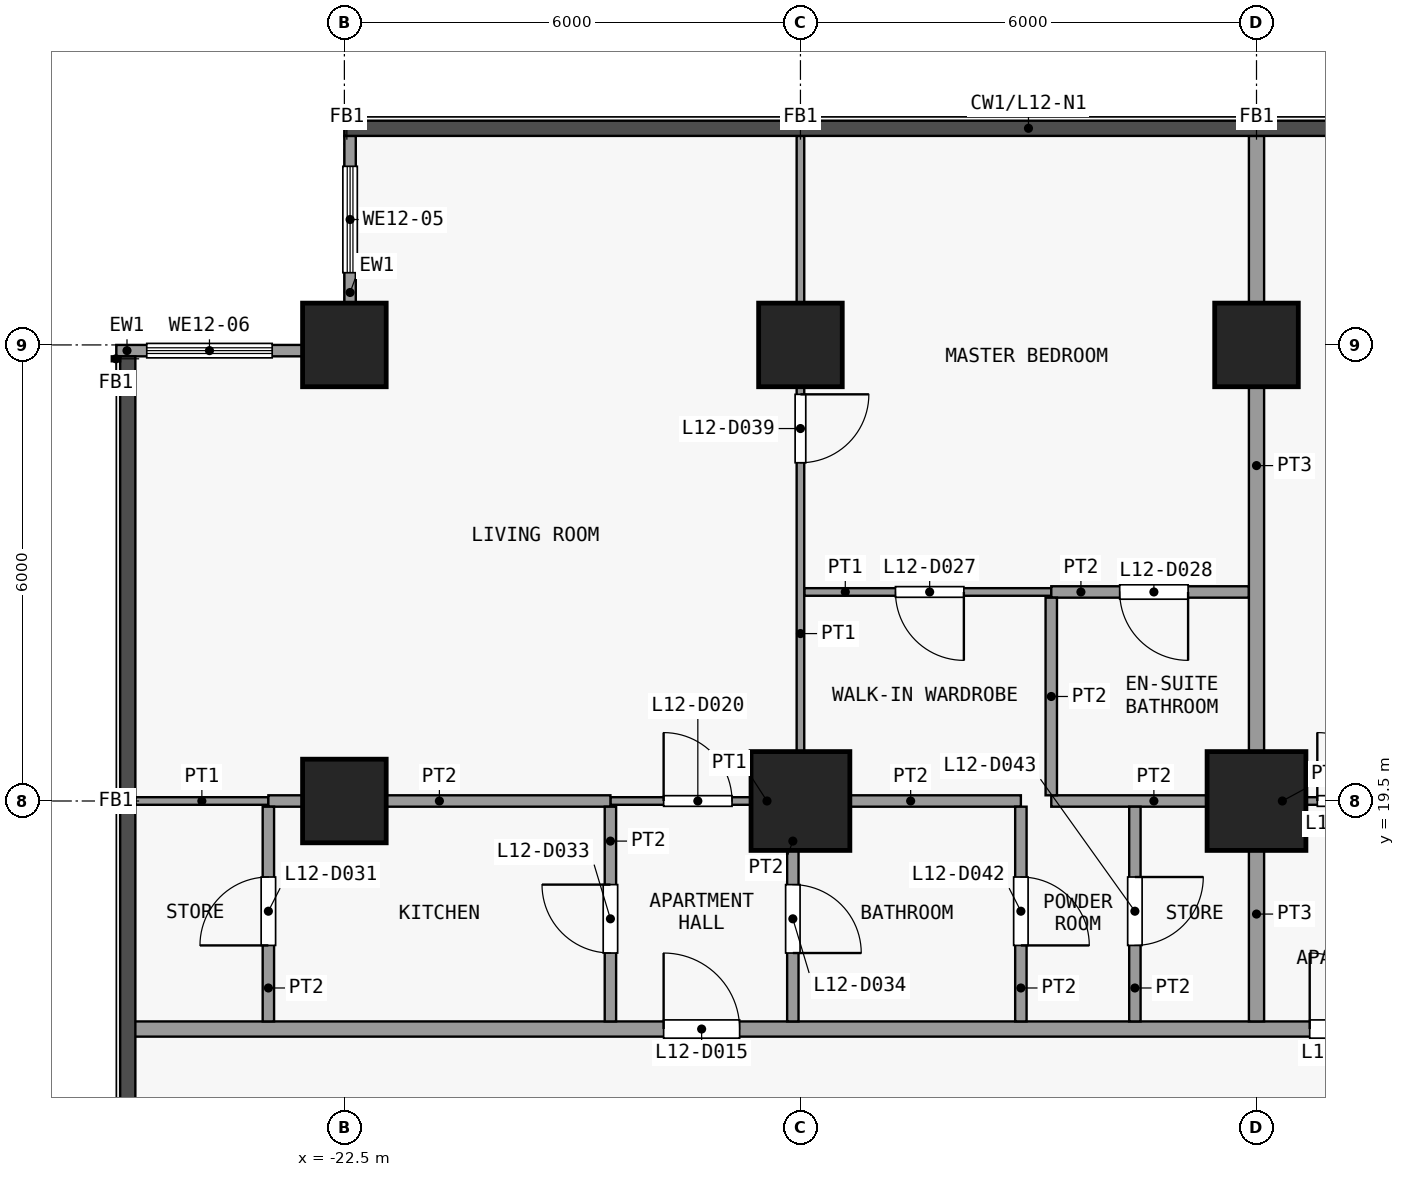
"""IFC4 building model, lengths in metres.
Left out: names, types, materials, properties, quantities, classifications, styles, units other than length and angle.
Written with IfcOpenShell. Run it as: python <this file> out.ifc"""

import sys

from ifc_helpers import new_model, si_unit, direction, frame, frame_2d, origin, origin_2d, place, context, subcontext, project, spatial, rectangle, extrude, element, fill, save


model = new_model("IFC4")
c1 = context("Model", 3, precision=1e-05, world=origin(), true_north=direction((0.0, 1.0)))
c2 = subcontext(c1, "Body", "Model", "MODEL_VIEW")
j1 = project(units=[si_unit("LENGTHUNIT", "METRE"), si_unit("PLANEANGLEUNIT", "RADIAN")], contexts=[c1])
p1 = place(None, origin())
s1 = spatial("IfcSite", under=j1, at=p1, CompositionType="ELEMENT")
p2 = place(p1, origin())
s2 = spatial("IfcBuilding", under=s1, at=p2, CompositionType="ELEMENT")
p3 = place(p2, frame((0.0, 0.0, 54.1)))
s3 = spatial("IfcBuildingStorey", under=s2, at=p3, CompositionType="ELEMENT", Elevation=54.1)
for number, where, z_axis, x_axis in (
    (1, (-22.5, 19.5, 0.0), (0.0, 0.0, 1.0), (1.0, 0.0, 0.0)),
    (2, (-22.5, 25.5, 0.0), (0.0, 0.0, 1.0), (1.0, 0.0, 0.0)),
):
    element("IfcColumn", number, at=place(p3, frame(where, z_axis=z_axis, x_axis=x_axis)), inside=s3, PredefinedType="COLUMN", context=c2, shape_type="SweptSolid", body=[
        extrude(rectangle(XDim=1.1, YDim=1.1, at=origin_2d()), origin(), (0.0, 0.0, 1.0), 3.6),
    ])
p4 = place(p3, frame((-16.5, 19.5, 0.0), z_axis=(0.0, 0.0, 1.0), x_axis=(1.0, 0.0, 0.0)))
e3 = element("IfcColumn", 3, at=p4, inside=s3, PredefinedType="COLUMN", context=c2, shape_type="SweptSolid", body=[
    extrude(rectangle(XDim=1.3, YDim=1.3, at=origin_2d()), origin(), (0.0, 0.0, 1.0), 3.6),
])
p5 = place(p3, frame((-16.5, 25.5, 0.0), z_axis=(0.0, 0.0, 1.0), x_axis=(1.0, 0.0, 0.0)))
e4 = element("IfcColumn", 4, at=p5, inside=s3, PredefinedType="COLUMN", context=c2, shape_type="SweptSolid", body=[
    extrude(rectangle(XDim=1.1, YDim=1.1, at=origin_2d()), origin(), (0.0, 0.0, 1.0), 3.6),
])
p6 = place(p3, frame((-10.5, 19.5, 0.0), z_axis=(0.0, 0.0, 1.0), x_axis=(1.0, 0.0, 0.0)))
e5 = element("IfcColumn", 5, at=p6, inside=s3, PredefinedType="COLUMN", context=c2, shape_type="SweptSolid", body=[
    extrude(rectangle(XDim=1.3, YDim=1.3, at=origin_2d()), origin(), (0.0, 0.0, 1.0), 3.6),
])
p7 = place(p3, frame((-10.5, 25.5, 0.0), z_axis=(0.0, 0.0, 1.0), x_axis=(1.0, 0.0, 0.0)))
e6 = element("IfcColumn", 6, at=p7, inside=s3, PredefinedType="COLUMN", context=c2, shape_type="SweptSolid", body=[
    extrude(rectangle(XDim=1.1, YDim=1.1, at=origin_2d()), origin(), (0.0, 0.0, 1.0), 3.6),
])
p8 = place(p3, frame((-22.425, 26.05, 0.0), z_axis=(0.0, 0.0, 1.0), x_axis=(0.0, 1.0, 0.0)))
e7 = element("IfcWall", 7, at=p8, inside=s3, PredefinedType="SOLIDWALL", context=c2, shape_type="SweptSolid", body=[
    extrude(rectangle(XDim=2.2, YDim=0.15, at=frame_2d((1.1, 0.0))), origin(), (0.0, 0.0, 1.0), 3.3),
])
p9 = place(p8, frame((0.4, 0.0, 0.9)))
e8 = element("IfcOpeningElement", 8, at=p9, cuts=e7, PredefinedType="OPENING", context=c2, shape_type="SweptSolid", body=[
    extrude(rectangle(XDim=1.4, YDim=2.4, at=frame_2d((0.7, 1.2))), frame((0.0, 0.085, 0.0), z_axis=(0.0, -1.0, 0.0), x_axis=(1.0, 0.0, 0.0)), (0.0, 0.0, 1.0), 0.17),
])
p10 = place(p3, frame((-25.5, 25.425, 0.0), z_axis=(0.0, 0.0, 1.0), x_axis=(1.0, 0.0, 0.0)))
e9 = element("IfcWall", 9, at=p10, inside=s3, PredefinedType="SOLIDWALL", context=c2, shape_type="SweptSolid", body=[
    extrude(rectangle(XDim=2.45, YDim=0.15, at=frame_2d((1.225, 0.0))), origin(), (0.0, 0.0, 1.0), 3.3),
])
p11 = place(p10, frame((0.4, 0.0, 0.9)))
e10 = element("IfcOpeningElement", 10, at=p11, cuts=e9, PredefinedType="OPENING", context=c2, shape_type="SweptSolid", body=[
    extrude(rectangle(XDim=1.65, YDim=2.4, at=frame_2d((0.825, 1.2))), frame((0.0, 0.085, 0.0), z_axis=(0.0, -1.0, 0.0), x_axis=(1.0, 0.0, 0.0)), (0.0, 0.0, 1.0), 0.17),
])
p12 = place(p3, frame((-25.35, 16.5, 0.0), z_axis=(0.0, 0.0, 1.0), x_axis=(1.0, 0.0, 0.0)))
e11 = element("IfcWall", 11, at=p12, inside=s3, PredefinedType="PARTITIONING", context=c2, shape_type="SweptSolid", body=[
    extrude(rectangle(XDim=49.2, YDim=0.2, at=frame_2d((24.6, 0.0))), origin(), (0.0, 0.0, 1.0), 3.3),
])
p13 = place(p12, frame((7.05, 0.0, 0.0)))
e12 = element("IfcOpeningElement", 12, at=p13, cuts=e11, PredefinedType="OPENING", context=c2, shape_type="SweptSolid", body=[
    extrude(rectangle(XDim=1.0, YDim=2.1, at=frame_2d((0.5, 1.05))), frame((0.0, 0.11, 0.0), z_axis=(0.0, -1.0, 0.0), x_axis=(1.0, 0.0, 0.0)), (0.0, 0.0, 1.0), 0.22),
])
p14 = place(p12, frame((15.55, 0.0, 0.0)))
e13 = element("IfcOpeningElement", 13, at=p14, cuts=e11, PredefinedType="OPENING", context=c2, shape_type="SweptSolid", body=[
    extrude(rectangle(XDim=1.0, YDim=2.1, at=frame_2d((0.5, 1.05))), frame((0.0, 0.11, 0.0), z_axis=(0.0, -1.0, 0.0), x_axis=(1.0, 0.0, 0.0)), (0.0, 0.0, 1.0), 0.22),
])
p15 = place(p12, frame((24.05, 0.0, 0.0)))
e14 = element("IfcOpeningElement", 14, at=p15, cuts=e11, PredefinedType="OPENING", context=c2, shape_type="SweptSolid", body=[
    extrude(rectangle(XDim=1.0, YDim=2.1, at=frame_2d((0.5, 1.05))), frame((0.0, 0.11, 0.0), z_axis=(0.0, -1.0, 0.0), x_axis=(1.0, 0.0, 0.0)), (0.0, 0.0, 1.0), 0.22),
])
p16 = place(p12, frame((36.55, 0.0, 0.0)))
e15 = element("IfcOpeningElement", 15, at=p16, cuts=e11, PredefinedType="OPENING", context=c2, shape_type="SweptSolid", body=[
    extrude(rectangle(XDim=1.0, YDim=2.1, at=frame_2d((0.5, 1.05))), frame((0.0, 0.11, 0.0), z_axis=(0.0, -1.0, 0.0), x_axis=(1.0, 0.0, 0.0)), (0.0, 0.0, 1.0), 0.22),
])
p17 = place(p12, frame((45.05, 0.0, 0.0)))
e16 = element("IfcOpeningElement", 16, at=p17, cuts=e11, PredefinedType="OPENING", context=c2, shape_type="SweptSolid", body=[
    extrude(rectangle(XDim=1.0, YDim=2.1, at=frame_2d((0.5, 1.05))), frame((0.0, 0.11, 0.0), z_axis=(0.0, -1.0, 0.0), x_axis=(1.0, 0.0, 0.0)), (0.0, 0.0, 1.0), 0.22),
])
p18 = place(p3, frame((-25.25, 19.5, 0.0), z_axis=(0.0, 0.0, 1.0), x_axis=(1.0, 0.0, 0.0)))
e17 = element("IfcWall", 17, at=p18, inside=s3, PredefinedType="PARTITIONING", context=c2, shape_type="SweptSolid", body=[
    extrude(rectangle(XDim=1.75, YDim=0.1, at=frame_2d((0.875, 0.0))), origin(), (0.0, 0.0, 1.0), 3.3),
])
p19 = place(p3, frame((-19.0, 19.5, 0.0), z_axis=(0.0, 0.0, 1.0), x_axis=(1.0, 0.0, 0.0)))
e18 = element("IfcWall", 18, at=p19, inside=s3, PredefinedType="PARTITIONING", context=c2, shape_type="SweptSolid", body=[
    extrude(rectangle(XDim=2.4, YDim=0.1, at=frame_2d((1.2, 0.0))), origin(), (0.0, 0.0, 1.0), 3.3),
])
p20 = place(p19, frame((0.7, 0.0, 0.0)))
e19 = element("IfcOpeningElement", 19, at=p20, cuts=e18, PredefinedType="OPENING", context=c2, shape_type="SweptSolid", body=[
    extrude(rectangle(XDim=0.9, YDim=2.1, at=frame_2d((0.45, 1.05))), frame((0.0, 0.06, 0.0), z_axis=(0.0, -1.0, 0.0), x_axis=(1.0, 0.0, 0.0)), (0.0, 0.0, 1.0), 0.12),
])
p21 = place(p3, frame((-10.5, 19.5, 0.0), z_axis=(0.0, 0.0, 1.0), x_axis=(1.0, 0.0, 0.0)))
e20 = element("IfcWall", 20, at=p21, inside=s3, PredefinedType="PARTITIONING", context=c2, shape_type="SweptSolid", body=[
    extrude(rectangle(XDim=2.4, YDim=0.1, at=frame_2d((1.2, 0.0))), origin(), (0.0, 0.0, 1.0), 3.3),
])
p22 = place(p21, frame((0.8, 0.0, 0.0)))
e21 = element("IfcOpeningElement", 21, at=p22, cuts=e20, PredefinedType="OPENING", context=c2, shape_type="SweptSolid", body=[
    extrude(rectangle(XDim=0.9, YDim=2.1, at=frame_2d((0.45, 1.05))), frame((0.0, 0.06, 0.0), z_axis=(0.0, -1.0, 0.0), x_axis=(1.0, 0.0, 0.0)), (0.0, 0.0, 1.0), 0.12),
])
p23 = place(p3, frame((-23.5, 19.5, 0.0), z_axis=(0.0, 0.0, 1.0), x_axis=(1.0, 0.0, 0.0)))
e22 = element("IfcWall", 22, at=p23, inside=s3, PredefinedType="PARTITIONING", context=c2, shape_type="SweptSolid", body=[
    extrude(rectangle(XDim=4.5, YDim=0.15, at=frame_2d((2.25, 0.0))), origin(), (0.0, 0.0, 1.0), 3.3),
])
p24 = place(p3, frame((-16.5, 19.5, 0.0), z_axis=(0.0, 0.0, 1.0), x_axis=(1.0, 0.0, 0.0)))
e23 = element("IfcWall", 23, at=p24, inside=s3, PredefinedType="PARTITIONING", context=c2, shape_type="SweptSolid", body=[
    extrude(rectangle(XDim=2.9, YDim=0.15, at=frame_2d((1.45, 0.0))), origin(), (0.0, 0.0, 1.0), 3.3),
])
p25 = place(p3, frame((-13.2, 19.5, 0.0), z_axis=(0.0, 0.0, 1.0), x_axis=(1.0, 0.0, 0.0)))
e24 = element("IfcWall", 24, at=p25, inside=s3, PredefinedType="PARTITIONING", context=c2, shape_type="SweptSolid", body=[
    extrude(rectangle(XDim=2.7, YDim=0.15, at=frame_2d((1.35, 0.0))), origin(), (0.0, 0.0, 1.0), 3.3),
])
p26 = place(p3, frame((-16.45, 22.25, 0.0), z_axis=(0.0, 0.0, 1.0), x_axis=(1.0, 0.0, 0.0)))
e25 = element("IfcWall", 25, at=p26, inside=s3, PredefinedType="PARTITIONING", context=c2, shape_type="SweptSolid", body=[
    extrude(rectangle(XDim=3.25, YDim=0.1, at=frame_2d((1.625, 0.0))), origin(), (0.0, 0.0, 1.0), 3.3),
])
p27 = place(p26, frame((1.2, 0.0, 0.0)))
e26 = element("IfcOpeningElement", 26, at=p27, cuts=e25, PredefinedType="OPENING", context=c2, shape_type="SweptSolid", body=[
    extrude(rectangle(XDim=0.9, YDim=2.1, at=frame_2d((0.45, 1.05))), frame((0.0, 0.06, 0.0), z_axis=(0.0, -1.0, 0.0), x_axis=(1.0, 0.0, 0.0)), (0.0, 0.0, 1.0), 0.12),
])
p28 = place(p3, frame((-13.2, 22.25, 0.0), z_axis=(0.0, 0.0, 1.0), x_axis=(1.0, 0.0, 0.0)))
e27 = element("IfcWall", 27, at=p28, inside=s3, PredefinedType="PARTITIONING", context=c2, shape_type="SweptSolid", body=[
    extrude(rectangle(XDim=2.6, YDim=0.15, at=frame_2d((1.3, 0.0))), origin(), (0.0, 0.0, 1.0), 3.3),
])
p29 = place(p28, frame((0.9, 0.0, 0.0)))
e28 = element("IfcOpeningElement", 28, at=p29, cuts=e27, PredefinedType="OPENING", context=c2, shape_type="SweptSolid", body=[
    extrude(rectangle(XDim=0.9, YDim=2.1, at=frame_2d((0.45, 1.05))), frame((0.0, 0.085, 0.0), z_axis=(0.0, -1.0, 0.0), x_axis=(1.0, 0.0, 0.0)), (0.0, 0.0, 1.0), 0.17),
])
p30 = place(p3, frame((-23.5, 16.6, 0.0), z_axis=(0.0, 0.0, 1.0), x_axis=(0.0, 1.0, 0.0)))
e29 = element("IfcWall", 29, at=p30, inside=s3, PredefinedType="PARTITIONING", context=c2, shape_type="SweptSolid", body=[
    extrude(rectangle(XDim=2.825, YDim=0.15, at=frame_2d((1.413, 0.0))), origin(), (0.0, 0.0, 1.0), 3.3),
])
p31 = place(p30, frame((1.0, 0.0, 0.0)))
e30 = element("IfcOpeningElement", 30, at=p31, cuts=e29, PredefinedType="OPENING", context=c2, shape_type="SweptSolid", body=[
    extrude(rectangle(XDim=0.9, YDim=2.1, at=frame_2d((0.45, 1.05))), frame((0.0, 0.085, 0.0), z_axis=(0.0, -1.0, 0.0), x_axis=(1.0, 0.0, 0.0)), (0.0, 0.0, 1.0), 0.17),
])
p32 = place(p3, frame((-19.0, 16.6, 0.0), z_axis=(0.0, 0.0, 1.0), x_axis=(0.0, 1.0, 0.0)))
e31 = element("IfcWall", 31, at=p32, inside=s3, PredefinedType="PARTITIONING", context=c2, shape_type="SweptSolid", body=[
    extrude(rectangle(XDim=2.825, YDim=0.15, at=frame_2d((1.413, 0.0))), origin(), (0.0, 0.0, 1.0), 3.3),
])
p33 = place(p32, frame((0.9, 0.0, 0.0)))
e32 = element("IfcOpeningElement", 32, at=p33, cuts=e31, PredefinedType="OPENING", context=c2, shape_type="SweptSolid", body=[
    extrude(rectangle(XDim=0.9, YDim=2.1, at=frame_2d((0.45, 1.05))), frame((0.0, 0.085, 0.0), z_axis=(0.0, -1.0, 0.0), x_axis=(1.0, 0.0, 0.0)), (0.0, 0.0, 1.0), 0.17),
])
p34 = place(p3, frame((-16.6, 16.6, 0.0), z_axis=(0.0, 0.0, 1.0), x_axis=(0.0, 1.0, 0.0)))
e33 = element("IfcWall", 33, at=p34, inside=s3, PredefinedType="PARTITIONING", context=c2, shape_type="SweptSolid", body=[
    extrude(rectangle(XDim=2.825, YDim=0.15, at=frame_2d((1.413, 0.0))), origin(), (0.0, 0.0, 1.0), 3.3),
])
p35 = place(p34, frame((0.9, 0.0, 0.0)))
e34 = element("IfcOpeningElement", 34, at=p35, cuts=e33, PredefinedType="OPENING", context=c2, shape_type="SweptSolid", body=[
    extrude(rectangle(XDim=0.9, YDim=2.1, at=frame_2d((0.45, 1.05))), frame((0.0, 0.085, 0.0), z_axis=(0.0, -1.0, 0.0), x_axis=(1.0, 0.0, 0.0)), (0.0, 0.0, 1.0), 0.17),
])
p36 = place(p3, frame((-16.5, 19.575, 0.0), z_axis=(0.0, 0.0, 1.0), x_axis=(0.0, 1.0, 0.0)))
e35 = element("IfcWall", 35, at=p36, inside=s3, PredefinedType="PARTITIONING", context=c2, shape_type="SweptSolid", body=[
    extrude(rectangle(XDim=8.675, YDim=0.1, at=frame_2d((4.337, 0.0))), origin(), (0.0, 0.0, 1.0), 3.3),
])
p37 = place(p36, frame((4.375, 0.0, 0.0)))
e36 = element("IfcOpeningElement", 36, at=p37, cuts=e35, PredefinedType="OPENING", context=c2, shape_type="SweptSolid", body=[
    extrude(rectangle(XDim=0.9, YDim=2.1, at=frame_2d((0.45, 1.05))), frame((0.0, 0.06, 0.0), z_axis=(0.0, -1.0, 0.0), x_axis=(1.0, 0.0, 0.0)), (0.0, 0.0, 1.0), 0.12),
])
p38 = place(p3, frame((-13.6, 16.6, 0.0), z_axis=(0.0, 0.0, 1.0), x_axis=(0.0, 1.0, 0.0)))
e37 = element("IfcWall", 37, at=p38, inside=s3, PredefinedType="PARTITIONING", context=c2, shape_type="SweptSolid", body=[
    extrude(rectangle(XDim=2.825, YDim=0.15, at=frame_2d((1.413, 0.0))), origin(), (0.0, 0.0, 1.0), 3.3),
])
p39 = place(p38, frame((1.0, 0.0, 0.0)))
e38 = element("IfcOpeningElement", 38, at=p39, cuts=e37, PredefinedType="OPENING", context=c2, shape_type="SweptSolid", body=[
    extrude(rectangle(XDim=0.9, YDim=2.1, at=frame_2d((0.45, 1.05))), frame((0.0, 0.085, 0.0), z_axis=(0.0, -1.0, 0.0), x_axis=(1.0, 0.0, 0.0)), (0.0, 0.0, 1.0), 0.17),
])
p40 = place(p3, frame((-13.2, 19.575, 0.0), z_axis=(0.0, 0.0, 1.0), x_axis=(0.0, 1.0, 0.0)))
e39 = element("IfcWall", 39, at=p40, inside=s3, PredefinedType="PARTITIONING", context=c2, shape_type="SweptSolid", body=[
    extrude(rectangle(XDim=2.6, YDim=0.15, at=frame_2d((1.3, 0.0))), origin(), (0.0, 0.0, 1.0), 3.3),
])
p41 = place(p3, frame((-12.1, 16.6, 0.0), z_axis=(0.0, 0.0, 1.0), x_axis=(0.0, 1.0, 0.0)))
e40 = element("IfcWall", 40, at=p41, inside=s3, PredefinedType="PARTITIONING", context=c2, shape_type="SweptSolid", body=[
    extrude(rectangle(XDim=2.825, YDim=0.15, at=frame_2d((1.413, 0.0))), origin(), (0.0, 0.0, 1.0), 3.3),
])
p42 = place(p41, frame((1.0, 0.0, 0.0)))
e41 = element("IfcOpeningElement", 41, at=p42, cuts=e40, PredefinedType="OPENING", context=c2, shape_type="SweptSolid", body=[
    extrude(rectangle(XDim=0.9, YDim=2.1, at=frame_2d((0.45, 1.05))), frame((0.0, 0.085, 0.0), z_axis=(0.0, -1.0, 0.0), x_axis=(1.0, 0.0, 0.0)), (0.0, 0.0, 1.0), 0.17),
])
p43 = place(p3, frame((-10.5, 16.6, 0.0), z_axis=(0.0, 0.0, 1.0), x_axis=(0.0, 1.0, 0.0)))
e42 = element("IfcWall", 42, at=p43, inside=s3, PredefinedType="PARTITIONING", context=c2, shape_type="SweptSolid", body=[
    extrude(rectangle(XDim=2.825, YDim=0.2, at=frame_2d((1.413, 0.0))), origin(), (0.0, 0.0, 1.0), 3.3),
])
p44 = place(p3, frame((-10.5, 19.575, 0.0), z_axis=(0.0, 0.0, 1.0), x_axis=(0.0, 1.0, 0.0)))
e43 = element("IfcWall", 43, at=p44, inside=s3, PredefinedType="PARTITIONING", context=c2, shape_type="SweptSolid", body=[
    extrude(rectangle(XDim=8.675, YDim=0.2, at=frame_2d((4.337, 0.0))), origin(), (0.0, 0.0, 1.0), 3.3),
])
p45 = place(p9, origin())
e44 = element("IfcWindow", 44, at=p45, inside=s3, PartitioningType="SINGLE_PANEL", PredefinedType="WINDOW", context=c2, shape_type="SweptSolid", body=[
    extrude(rectangle(XDim=1.4, YDim=2.4, at=frame_2d((0.7, 1.2))), frame((0.0, 0.03, 0.0), z_axis=(0.0, -1.0, 0.0), x_axis=(1.0, 0.0, 0.0)), (0.0, 0.0, 1.0), 0.06),
])
fill(e8, e44)
p46 = place(p11, origin())
e45 = element("IfcWindow", 45, at=p46, inside=s3, PartitioningType="SINGLE_PANEL", PredefinedType="WINDOW", context=c2, shape_type="SweptSolid", body=[
    extrude(rectangle(XDim=1.65, YDim=2.4, at=frame_2d((0.825, 1.2))), frame((0.0, 0.03, 0.0), z_axis=(0.0, -1.0, 0.0), x_axis=(1.0, 0.0, 0.0)), (0.0, 0.0, 1.0), 0.06),
])
fill(e10, e45)
p47 = place(p13, origin())
e46 = element("IfcDoor", 46, at=p47, inside=s3, OperationType="SINGLE_SWING_RIGHT", PredefinedType="DOOR", context=c2, shape_type="SweptSolid", body=[
    extrude(rectangle(XDim=1.0, YDim=2.1, at=frame_2d((0.5, 1.05))), frame((0.0, 0.025, 0.0), z_axis=(0.0, -1.0, 0.0), x_axis=(1.0, 0.0, 0.0)), (0.0, 0.0, 1.0), 0.05),
])
fill(e12, e46)
p48 = place(p14, origin())
e47 = element("IfcDoor", 47, at=p48, inside=s3, OperationType="SINGLE_SWING_RIGHT", PredefinedType="DOOR", context=c2, shape_type="SweptSolid", body=[
    extrude(rectangle(XDim=1.0, YDim=2.1, at=frame_2d((0.5, 1.05))), frame((0.0, 0.025, 0.0), z_axis=(0.0, -1.0, 0.0), x_axis=(1.0, 0.0, 0.0)), (0.0, 0.0, 1.0), 0.05),
])
fill(e13, e47)
p49 = place(p20, origin())
e48 = element("IfcDoor", 48, at=p49, inside=s3, OperationType="SINGLE_SWING_RIGHT", PredefinedType="DOOR", context=c2, shape_type="SweptSolid", body=[
    extrude(rectangle(XDim=0.9, YDim=2.1, at=frame_2d((0.45, 1.05))), frame((0.0, 0.025, 0.0), z_axis=(0.0, -1.0, 0.0), x_axis=(1.0, 0.0, 0.0)), (0.0, 0.0, 1.0), 0.05),
])
fill(e19, e48)
p50 = place(p22, origin())
e49 = element("IfcDoor", 49, at=p50, inside=s3, OperationType="SINGLE_SWING_RIGHT", PredefinedType="DOOR", context=c2, shape_type="SweptSolid", body=[
    extrude(rectangle(XDim=0.9, YDim=2.1, at=frame_2d((0.45, 1.05))), frame((0.0, 0.025, 0.0), z_axis=(0.0, -1.0, 0.0), x_axis=(1.0, 0.0, 0.0)), (0.0, 0.0, 1.0), 0.05),
])
fill(e21, e49)
p51 = place(p27, origin())
e50 = element("IfcDoor", 50, at=p51, inside=s3, OperationType="SINGLE_SWING_RIGHT", PredefinedType="DOOR", context=c2, shape_type="SweptSolid", body=[
    extrude(rectangle(XDim=0.9, YDim=2.1, at=frame_2d((0.45, 1.05))), frame((0.0, 0.025, 0.0), z_axis=(0.0, -1.0, 0.0), x_axis=(1.0, 0.0, 0.0)), (0.0, 0.0, 1.0), 0.05),
])
fill(e26, e50)
p52 = place(p29, origin())
e51 = element("IfcDoor", 51, at=p52, inside=s3, OperationType="SINGLE_SWING_RIGHT", PredefinedType="DOOR", context=c2, shape_type="SweptSolid", body=[
    extrude(rectangle(XDim=0.9, YDim=2.1, at=frame_2d((0.45, 1.05))), frame((0.0, 0.025, 0.0), z_axis=(0.0, -1.0, 0.0), x_axis=(1.0, 0.0, 0.0)), (0.0, 0.0, 1.0), 0.05),
])
fill(e28, e51)
p53 = place(p31, origin())
e52 = element("IfcDoor", 52, at=p53, inside=s3, OperationType="SINGLE_SWING_RIGHT", PredefinedType="DOOR", context=c2, shape_type="SweptSolid", body=[
    extrude(rectangle(XDim=0.9, YDim=2.1, at=frame_2d((0.45, 1.05))), frame((0.0, 0.025, 0.0), z_axis=(0.0, -1.0, 0.0), x_axis=(1.0, 0.0, 0.0)), (0.0, 0.0, 1.0), 0.05),
])
fill(e30, e52)
p54 = place(p33, origin())
e53 = element("IfcDoor", 53, at=p54, inside=s3, OperationType="SINGLE_SWING_LEFT", PredefinedType="DOOR", context=c2, shape_type="SweptSolid", body=[
    extrude(rectangle(XDim=0.9, YDim=2.1, at=frame_2d((0.45, 1.05))), frame((0.0, 0.025, 0.0), z_axis=(0.0, -1.0, 0.0), x_axis=(1.0, 0.0, 0.0)), (0.0, 0.0, 1.0), 0.05),
])
fill(e32, e53)
p55 = place(p35, origin())
e54 = element("IfcDoor", 54, at=p55, inside=s3, OperationType="SINGLE_SWING_LEFT", PredefinedType="DOOR", context=c2, shape_type="SweptSolid", body=[
    extrude(rectangle(XDim=0.9, YDim=2.1, at=frame_2d((0.45, 1.05))), frame((0.0, 0.025, 0.0), z_axis=(0.0, -1.0, 0.0), x_axis=(1.0, 0.0, 0.0)), (0.0, 0.0, 1.0), 0.05),
])
fill(e34, e54)
p56 = place(p37, origin())
e55 = element("IfcDoor", 55, at=p56, inside=s3, OperationType="SINGLE_SWING_RIGHT", PredefinedType="DOOR", context=c2, shape_type="SweptSolid", body=[
    extrude(rectangle(XDim=0.9, YDim=2.1, at=frame_2d((0.45, 1.05))), frame((0.0, 0.025, 0.0), z_axis=(0.0, -1.0, 0.0), x_axis=(1.0, 0.0, 0.0)), (0.0, 0.0, 1.0), 0.05),
])
fill(e36, e55)
p57 = place(p39, origin())
e56 = element("IfcDoor", 56, at=p57, inside=s3, OperationType="SINGLE_SWING_LEFT", PredefinedType="DOOR", context=c2, shape_type="SweptSolid", body=[
    extrude(rectangle(XDim=0.9, YDim=2.1, at=frame_2d((0.45, 1.05))), frame((0.0, 0.025, 0.0), z_axis=(0.0, -1.0, 0.0), x_axis=(1.0, 0.0, 0.0)), (0.0, 0.0, 1.0), 0.05),
])
fill(e38, e56)
p58 = place(p42, origin())
e57 = element("IfcDoor", 57, at=p58, inside=s3, OperationType="SINGLE_SWING_RIGHT", PredefinedType="DOOR", context=c2, shape_type="SweptSolid", body=[
    extrude(rectangle(XDim=0.9, YDim=2.1, at=frame_2d((0.45, 1.05))), frame((0.0, 0.025, 0.0), z_axis=(0.0, -1.0, 0.0), x_axis=(1.0, 0.0, 0.0)), (0.0, 0.0, 1.0), 0.05),
])
fill(e41, e57)
save(model, sys.argv[1])
